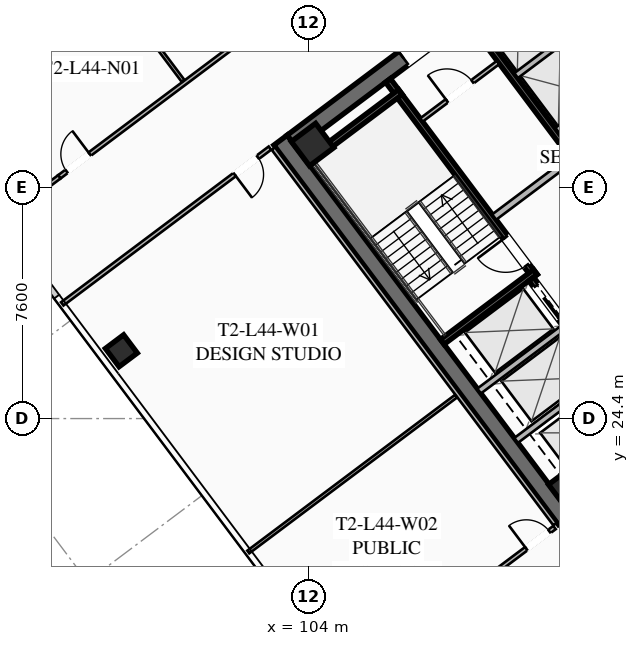
"""IFC4 building model, lengths in metres.
Left out: names, types, materials, properties, quantities, classifications, styles, units other than length and angle.
Written with IfcOpenShell. Run it as: python <this file> out.ifc"""

import sys

from ifc_helpers import new_model, si_unit, direction, frame, frame_2d, origin, origin_2d, place, context, subcontext, project, spatial, rectangle, hollow_rectangle, extrude, element, fill, save


model = new_model("IFC4")
c1 = context("Model", 3, precision=1e-05, world=origin(), true_north=direction((0.0, 1.0)))
c2 = subcontext(c1, "Body", "Model", "MODEL_VIEW")
j1 = project(units=[si_unit("LENGTHUNIT", "METRE"), si_unit("PLANEANGLEUNIT", "RADIAN")], contexts=[c1])
p1 = place(None, origin())
s1 = spatial("IfcSite", under=j1, at=p1, CompositionType="ELEMENT")
p2 = place(p1, origin())
s2 = spatial("IfcBuilding", under=s1, at=p2, CompositionType="ELEMENT")
p3 = place(p2, frame((0.0, 0.0, 164.1)))
s3 = spatial("IfcBuildingStorey", under=s2, at=p3, CompositionType="ELEMENT", Elevation=164.1)
p4 = place(p3, frame((112.436, 21.077, 0.0), z_axis=(0.0, 0.0, 1.0), x_axis=(-0.600005007985, 0.799996243986, 0.0)))
e1 = element("IfcWall", 1, at=p4, inside=s3, PredefinedType="SHEAR", context=c2, shape_type="SweptSolid", body=[
    extrude(rectangle(XDim=15.6, YDim=0.55, at=frame_2d((7.8, 0.0))), origin(), (0.0, 0.0, 1.0), 3.55),
])
p5 = place(p3, frame((103.461, 33.502, 0.0), z_axis=(0.0, 0.0, 1.0), x_axis=(0.799998054672, 0.600002593761, 0.0)))
e2 = element("IfcWall", 2, at=p5, inside=s3, PredefinedType="SHEAR", context=c2, shape_type="SweptSolid", body=[
    extrude(rectangle(XDim=15.06, YDim=0.55, at=frame_2d((7.53, 0.0))), origin(), (0.0, 0.0, 1.0), 3.55),
])
p6 = place(p5, frame((4.58, 0.0, 0.0)))
e3 = element("IfcOpeningElement", 3, at=p6, cuts=e2, PredefinedType="OPENING", context=c2, shape_type="SweptSolid", body=[
    extrude(rectangle(XDim=1.25, YDim=2.25, at=frame_2d((0.625, 1.125))), frame((0.0, 0.285, 0.0), z_axis=(0.0, -1.0, 0.0), x_axis=(1.0, 0.0, 0.0)), (0.0, 0.0, 1.0), 0.57),
])
p7 = place(p5, frame((9.63, 0.0, 0.0)))
e4 = element("IfcOpeningElement", 4, at=p7, cuts=e2, PredefinedType="OPENING", context=c2, shape_type="SweptSolid", body=[
    extrude(rectangle(XDim=1.25, YDim=2.25, at=frame_2d((0.625, 1.125))), frame((0.0, 0.285, 0.0), z_axis=(0.0, -1.0, 0.0), x_axis=(1.0, 0.0, 0.0)), (0.0, 0.0, 1.0), 0.57),
])
for number, where, z_axis, x_axis in (
    (5, (112.59, 22.13, 0.0), (0.0, 0.0, 1.0), (0.8, 0.6, 0.0)),
    (6, (104.13, 33.41, 0.0), (0.0, 0.0, 1.0), (0.8, 0.6, 0.0)),
):
    element("IfcColumn", number, at=place(p3, frame(where, z_axis=z_axis, x_axis=x_axis)), inside=s3, PredefinedType="COLUMN", context=c2, shape_type="SweptSolid", body=[
        extrude(hollow_rectangle(XDim=1.0, YDim=1.0, WallThickness=0.04, at=origin_2d()), origin(), (0.0, 0.0, 1.0), 3.37),
    ])
p8 = place(p3, frame((97.84, 26.63, 0.0), z_axis=(0.0, 0.0, 1.0), x_axis=(0.799999996291, 0.600000004945, 0.0)))
e7 = element("IfcColumn", 7, at=p8, inside=s3, PredefinedType="COLUMN", context=c2, shape_type="SweptSolid", body=[
    extrude(hollow_rectangle(XDim=0.75, YDim=0.75, WallThickness=0.032, at=origin_2d()), origin(), (0.0, 0.0, 1.0), 3.37),
])
p9 = place(p3, frame((111.44, 29.08, 0.0), z_axis=(0.0, 0.0, 1.0), x_axis=(-0.59999029481, 0.8000072788, 0.0)))
e8 = element("IfcWall", 8, at=p9, inside=s3, PredefinedType="SHEAR", context=c2, shape_type="SweptSolid", body=[
    extrude(rectangle(XDim=8.05, YDim=0.2, at=frame_2d((4.025, 0.0))), origin(), (0.0, 0.0, 1.0), 3.37),
])
p10 = place(p9, frame((0.45, 0.0, 0.0)))
e9 = element("IfcOpeningElement", 9, at=p10, cuts=e8, PredefinedType="OPENING", context=c2, shape_type="SweptSolid", body=[
    extrude(rectangle(XDim=1.15, YDim=2.2, at=frame_2d((0.575, 1.1))), frame((0.0, 0.11, 0.0), z_axis=(0.0, -1.0, 0.0), x_axis=(1.0, 0.0, 0.0)), (0.0, 0.0, 1.0), 0.22),
])
for number, where, z_axis, x_axis in (
    (10, (108.396, 26.922, 0.0), (0.0, 0.0, 1.0), (0.8, 0.6, 0.0)),
    (11, (103.956, 32.842, 0.0), (0.0, 0.0, 1.0), (0.8, 0.6, 0.0)),
):
    element("IfcWall", number, at=place(p3, frame(where, z_axis=z_axis, x_axis=x_axis)), inside=s3, PredefinedType="SHEAR", context=c2, shape_type="SweptSolid", body=[
        extrude(rectangle(XDim=3.83, YDim=0.2, at=frame_2d((1.915, 0.0))), origin(), (0.0, 0.0, 1.0), 3.37),
    ])
p11 = place(p3, frame((117.998, 25.936, 0.0), z_axis=(0.0, 0.0, 1.0), x_axis=(-0.600002693989, 0.799997979501, 0.0)))
e12 = element("IfcWall", 12, at=p11, inside=s3, PredefinedType="SHEAR", context=c2, shape_type="SweptSolid", body=[
    extrude(rectangle(XDim=14.5, YDim=0.2, at=frame_2d((7.25, 0.0))), origin(), (0.0, 0.0, 1.0), 3.37),
])
p12 = place(p3, frame((110.104, 31.028, 0.0), z_axis=(0.0, 0.0, 1.0), x_axis=(0.800018601094, 0.59997519774, 0.0)))
e13 = element("IfcWall", 13, at=p12, inside=s3, PredefinedType="SOLIDWALL", context=c2, shape_type="SweptSolid", body=[
    extrude(rectangle(XDim=3.15, YDim=0.22, at=frame_2d((1.575, 0.0))), origin(), (0.0, 0.0, 1.0), 2.723),
])
p13 = place(p3, frame((115.19, 23.83, 0.0), z_axis=(0.0, 0.0, 1.0), x_axis=(-0.599993943644, 0.800004542231, 0.0)))
e14 = element("IfcWall", 14, at=p13, inside=s3, PredefinedType="SHEAR", context=c2, shape_type="SweptSolid", body=[
    extrude(rectangle(XDim=6.45, YDim=0.2, at=frame_2d((3.225, 0.0))), origin(), (0.0, 0.0, 1.0), 3.37),
])
p14 = place(p13, frame((4.875, 0.0, 0.0)))
e15 = element("IfcOpeningElement", 15, at=p14, cuts=e14, PredefinedType="OPENING", context=c2, shape_type="SweptSolid", body=[
    extrude(rectangle(XDim=1.3, YDim=2.25, at=frame_2d((0.65, 1.125))), frame((0.0, 0.11, 0.0), z_axis=(0.0, -1.0, 0.0), x_axis=(1.0, 0.0, 0.0)), (0.0, 0.0, 1.0), 0.22),
])
p15 = place(p13, frame((2.875, 0.0, 0.0)))
e16 = element("IfcOpeningElement", 16, at=p15, cuts=e14, PredefinedType="OPENING", context=c2, shape_type="SweptSolid", body=[
    extrude(rectangle(XDim=1.3, YDim=2.25, at=frame_2d((0.65, 1.125))), frame((0.0, 0.11, 0.0), z_axis=(0.0, -1.0, 0.0), x_axis=(1.0, 0.0, 0.0)), (0.0, 0.0, 1.0), 0.22),
])
p16 = place(p13, frame((0.675, 0.0, 0.0)))
e17 = element("IfcOpeningElement", 17, at=p16, cuts=e14, PredefinedType="OPENING", context=c2, shape_type="SweptSolid", body=[
    extrude(rectangle(XDim=1.3, YDim=2.25, at=frame_2d((0.65, 1.125))), frame((0.0, 0.11, 0.0), z_axis=(0.0, -1.0, 0.0), x_axis=(1.0, 0.0, 0.0)), (0.0, 0.0, 1.0), 0.22),
])
for number, where, z_axis, x_axis in (
    (18, (110.826, 23.682, 0.0), (0.0, 0.0, 1.0), (0.8, 0.6, 0.0)),
    (19, (109.608, 25.306, 0.0), (0.0, 0.0, 1.0), (0.8, 0.6, 0.0)),
):
    element("IfcWall", number, at=place(p3, frame(where, z_axis=z_axis, x_axis=x_axis)), inside=s3, PredefinedType="SOLIDWALL", context=c2, shape_type="SweptSolid", body=[
        extrude(rectangle(XDim=3.48, YDim=0.2, at=frame_2d((1.74, 0.0))), origin(), (0.0, 0.0, 1.0), 3.37),
    ])
p17 = place(p3, frame((107.71, 34.22, 0.0), z_axis=(0.0, 0.0, 1.0), x_axis=(0.799981399002, 0.60002480053, 0.0)))
e20 = element("IfcWall", 20, at=p17, inside=s3, PredefinedType="PARTITIONING", context=c2, shape_type="SweptSolid", body=[
    extrude(rectangle(XDim=3.15, YDim=0.135, at=frame_2d((1.575, 0.0))), origin(), (0.0, 0.0, 1.0), 2.723),
])
p18 = place(p17, frame((1.05, 0.0, 0.0)))
e21 = element("IfcOpeningElement", 21, at=p18, cuts=e20, PredefinedType="OPENING", context=c2, shape_type="SweptSolid", body=[
    extrude(rectangle(XDim=1.05, YDim=2.2, at=frame_2d((0.525, 1.1))), frame((0.0, 0.077, 0.0), z_axis=(0.0, -1.0, 0.0), x_axis=(1.0, 0.0, 0.0)), (0.0, 0.0, 1.0), 0.155),
])
p19 = place(p3, frame((115.11, 33.27, 0.0), z_axis=(0.0, 0.0, 1.0), x_axis=(-0.600011322243, 0.799991508192, 0.0)))
e22 = element("IfcWall", 22, at=p19, inside=s3, PredefinedType="SOLIDWALL", context=c2, shape_type="SweptSolid", body=[
    extrude(rectangle(XDim=6.9, YDim=0.2, at=frame_2d((3.45, 0.0))), origin(), (0.0, 0.0, 1.0), 3.37),
])
p20 = place(p19, frame((0.575, 0.0, 0.0)))
e23 = element("IfcOpeningElement", 23, at=p20, cuts=e22, PredefinedType="OPENING", context=c2, shape_type="SweptSolid", body=[
    extrude(rectangle(XDim=1.1, YDim=2.2, at=frame_2d((0.55, 1.1))), frame((0.0, 0.11, 0.0), z_axis=(0.0, -1.0, 0.0), x_axis=(1.0, 0.0, 0.0)), (0.0, 0.0, 1.0), 0.22),
])
p21 = place(p19, frame((2.825, 0.0, 0.0)))
e24 = element("IfcOpeningElement", 24, at=p21, cuts=e22, PredefinedType="OPENING", context=c2, shape_type="SweptSolid", body=[
    extrude(rectangle(XDim=1.1, YDim=2.2, at=frame_2d((0.55, 1.1))), frame((0.0, 0.11, 0.0), z_axis=(0.0, -1.0, 0.0), x_axis=(1.0, 0.0, 0.0)), (0.0, 0.0, 1.0), 0.22),
])
p22 = place(p19, frame((5.075, 0.0, 0.0)))
e25 = element("IfcOpeningElement", 25, at=p22, cuts=e22, PredefinedType="OPENING", context=c2, shape_type="SweptSolid", body=[
    extrude(rectangle(XDim=1.1, YDim=2.2, at=frame_2d((0.55, 1.1))), frame((0.0, 0.11, 0.0), z_axis=(0.0, -1.0, 0.0), x_axis=(1.0, 0.0, 0.0)), (0.0, 0.0, 1.0), 0.22),
])
p23 = place(p3, frame((112.176, 33.882, 0.0), z_axis=(0.0, 0.0, 1.0), x_axis=(0.8, 0.6, 0.0)))
e26 = element("IfcWall", 26, at=p23, inside=s3, PredefinedType="SOLIDWALL", context=c2, shape_type="SweptSolid", body=[
    extrude(rectangle(XDim=1.88, YDim=0.2, at=frame_2d((0.94, 0.0))), origin(), (0.0, 0.0, 1.0), 3.37),
])
p24 = place(p3, frame((110.826, 35.682, 0.0), z_axis=(0.0, 0.0, 1.0), x_axis=(0.799984418148, 0.600020775241, 0.0)))
e27 = element("IfcWall", 27, at=p24, inside=s3, PredefinedType="SOLIDWALL", context=c2, shape_type="SweptSolid", body=[
    extrude(rectangle(XDim=1.88, YDim=0.2, at=frame_2d((0.94, 0.0))), origin(), (0.0, 0.0, 1.0), 3.37),
])
p25 = place(p3, frame((95.8, 32.35, 0.0), z_axis=(0.0, 0.0, 1.0), x_axis=(0.8, 0.6, 0.0)))
e28 = element("IfcWall", 28, at=p25, inside=s3, PredefinedType="PARTITIONING", context=c2, shape_type="SweptSolid", body=[
    extrude(rectangle(XDim=28.7, YDim=0.135, at=frame_2d((14.35, 0.0))), origin(), (0.0, 0.0, 1.0), 2.723),
])
p26 = place(p25, frame((0.3, 0.0, 0.0)))
e29 = element("IfcOpeningElement", 29, at=p26, cuts=e28, PredefinedType="OPENING", context=c2, shape_type="SweptSolid", body=[
    extrude(rectangle(XDim=0.95, YDim=2.05, at=frame_2d((0.475, 1.025))), frame((0.0, 0.077, 0.0), z_axis=(0.0, -1.0, 0.0), x_axis=(1.0, 0.0, 0.0)), (0.0, 0.0, 1.0), 0.155),
])
p27 = place(p25, frame((9.959, 0.0, 0.0)))
e30 = element("IfcOpeningElement", 30, at=p27, cuts=e28, PredefinedType="OPENING", context=c2, shape_type="SweptSolid", body=[
    extrude(rectangle(XDim=0.95, YDim=2.05, at=frame_2d((0.475, 1.025))), frame((0.0, 0.077, 0.0), z_axis=(0.0, -1.0, 0.0), x_axis=(1.0, 0.0, 0.0)), (0.0, 0.0, 1.0), 0.155),
])
p28 = place(p25, frame((14.005, 0.0, 0.0)))
e31 = element("IfcOpeningElement", 31, at=p28, cuts=e28, PredefinedType="OPENING", context=c2, shape_type="SweptSolid", body=[
    extrude(rectangle(XDim=0.95, YDim=2.05, at=frame_2d((0.475, 1.025))), frame((0.0, 0.077, 0.0), z_axis=(0.0, -1.0, 0.0), x_axis=(1.0, 0.0, 0.0)), (0.0, 0.0, 1.0), 0.155),
])
p29 = place(p25, frame((18.049, 0.0, 0.0)))
e32 = element("IfcOpeningElement", 32, at=p29, cuts=e28, PredefinedType="OPENING", context=c2, shape_type="SweptSolid", body=[
    extrude(rectangle(XDim=0.95, YDim=2.05, at=frame_2d((0.475, 1.025))), frame((0.0, 0.077, 0.0), z_axis=(0.0, -1.0, 0.0), x_axis=(1.0, 0.0, 0.0)), (0.0, 0.0, 1.0), 0.155),
])
p30 = place(p25, frame((27.45, 0.0, 0.0)))
e33 = element("IfcOpeningElement", 33, at=p30, cuts=e28, PredefinedType="OPENING", context=c2, shape_type="SweptSolid", body=[
    extrude(rectangle(XDim=0.95, YDim=2.05, at=frame_2d((0.475, 1.025))), frame((0.0, 0.077, 0.0), z_axis=(0.0, -1.0, 0.0), x_axis=(1.0, 0.0, 0.0)), (0.0, 0.0, 1.0), 0.155),
])
p31 = place(p3, frame((93.856, 30.892, 0.0), z_axis=(0.0, 0.0, 1.0), x_axis=(0.800012055778, 0.599983925293, 0.0)))
e34 = element("IfcWall", 34, at=p31, inside=s3, PredefinedType="PARTITIONING", context=c2, shape_type="SweptSolid", body=[
    extrude(rectangle(XDim=2.43, YDim=0.135, at=frame_2d((1.215, 0.0))), origin(), (0.0, 0.0, 1.0), 2.723),
])
p32 = place(p3, frame((99.872, 35.504, 0.0), z_axis=(0.0, 0.0, 1.0), x_axis=(-0.599992897893, 0.800005326531, 0.0)))
e35 = element("IfcWall", 35, at=p32, inside=s3, PredefinedType="PARTITIONING", context=c2, shape_type="SweptSolid", body=[
    extrude(rectangle(XDim=5.5, YDim=0.11, at=frame_2d((2.75, 0.0))), origin(), (0.0, 0.0, 1.0), 2.723),
])
p33 = place(p3, frame((131.282, 32.874, 0.0), z_axis=(0.0, 0.0, 1.0), x_axis=(-0.8, -0.6, 0.0)))
e36 = element("IfcWall", 36, at=p33, inside=s3, PredefinedType="PARTITIONING", context=c2, shape_type="SweptSolid", body=[
    extrude(rectangle(XDim=28.7, YDim=0.135, at=frame_2d((14.35, 0.0))), origin(), (0.0, 0.0, 1.0), 2.723),
])
p34 = place(p33, frame((27.37, 0.0, 0.0)))
e37 = element("IfcOpeningElement", 37, at=p34, cuts=e36, PredefinedType="OPENING", context=c2, shape_type="SweptSolid", body=[
    extrude(rectangle(XDim=0.95, YDim=2.05, at=frame_2d((0.475, 1.025))), frame((0.0, 0.077, 0.0), z_axis=(0.0, -1.0, 0.0), x_axis=(1.0, 0.0, 0.0)), (0.0, 0.0, 1.0), 0.155),
])
p35 = place(p33, frame((13.592, 0.0, 0.0)))
e38 = element("IfcOpeningElement", 38, at=p35, cuts=e36, PredefinedType="OPENING", context=c2, shape_type="SweptSolid", body=[
    extrude(rectangle(XDim=0.95, YDim=2.05, at=frame_2d((0.475, 1.025))), frame((0.0, 0.077, 0.0), z_axis=(0.0, -1.0, 0.0), x_axis=(1.0, 0.0, 0.0)), (0.0, 0.0, 1.0), 0.155),
])
p36 = place(p33, frame((0.38, 0.0, 0.0)))
e39 = element("IfcOpeningElement", 39, at=p36, cuts=e36, PredefinedType="OPENING", context=c2, shape_type="SweptSolid", body=[
    extrude(rectangle(XDim=0.95, YDim=2.05, at=frame_2d((0.475, 1.025))), frame((0.0, 0.077, 0.0), z_axis=(0.0, -1.0, 0.0), x_axis=(1.0, 0.0, 0.0)), (0.0, 0.0, 1.0), 0.155),
])
p37 = place(p3, frame((112.104, 20.928, 0.0), z_axis=(0.0, 0.0, 1.0), x_axis=(-0.599994940075, 0.800003794918, 0.0)))
e40 = element("IfcWall", 40, at=p37, inside=s3, PredefinedType="PARTITIONING", context=c2, shape_type="SweptSolid", body=[
    extrude(rectangle(XDim=15.44, YDim=0.135, at=frame_2d((7.72, 0.0))), origin(), (0.0, 0.0, 1.0), 2.723),
])
p38 = place(p3, frame((102.728, 33.296, 0.0), z_axis=(0.0, 0.0, 1.0), x_axis=(-0.800013722153, -0.59998170336, 0.0)))
e41 = element("IfcWall", 41, at=p38, inside=s3, PredefinedType="PARTITIONING", context=c2, shape_type="SweptSolid", body=[
    extrude(rectangle(XDim=8.54, YDim=0.135, at=frame_2d((4.27, 0.0))), origin(), (0.0, 0.0, 1.0), 2.723),
])
p39 = place(p38, frame((0.5, 0.0, 0.0)))
e42 = element("IfcOpeningElement", 42, at=p39, cuts=e41, PredefinedType="OPENING", context=c2, shape_type="SweptSolid", body=[
    extrude(rectangle(XDim=0.95, YDim=2.05, at=frame_2d((0.475, 1.025))), frame((0.0, 0.077, 0.0), z_axis=(0.0, -1.0, 0.0), x_axis=(1.0, 0.0, 0.0)), (0.0, 0.0, 1.0), 0.155),
])
p40 = place(p3, frame((105.256, 15.692, 0.0), z_axis=(0.0, 0.0, 1.0), x_axis=(0.799989708052, 0.600013722352, 0.0)))
e43 = element("IfcWall", 43, at=p40, inside=s3, PredefinedType="PARTITIONING", context=c2, shape_type="SweptSolid", body=[
    extrude(rectangle(XDim=8.54, YDim=0.135, at=frame_2d((4.27, 0.0))), origin(), (0.0, 0.0, 1.0), 2.723),
])
p41 = place(p40, frame((7.38, 0.0, 0.0)))
e44 = element("IfcOpeningElement", 44, at=p41, cuts=e43, PredefinedType="OPENING", context=c2, shape_type="SweptSolid", body=[
    extrude(rectangle(XDim=0.95, YDim=2.05, at=frame_2d((0.475, 1.025))), frame((0.0, 0.077, 0.0), z_axis=(0.0, -1.0, 0.0), x_axis=(1.0, 0.0, 0.0)), (0.0, 0.0, 1.0), 0.155),
])
p42 = place(p3, frame((102.016, 20.012, 0.0), z_axis=(0.0, 0.0, 1.0), x_axis=(0.799989708052, 0.600013722352, 0.0)))
e45 = element("IfcWall", 45, at=p42, inside=s3, PredefinedType="PARTITIONING", context=c2, shape_type="SweptSolid", body=[
    extrude(rectangle(XDim=8.54, YDim=0.11, at=frame_2d((4.27, 0.0))), origin(), (0.0, 0.0, 1.0), 2.723),
])
p43 = place(p6, origin())
e46 = element("IfcDoor", 46, at=p43, inside=s3, OperationType="SINGLE_SWING_LEFT", PredefinedType="DOOR", context=c2, shape_type="SweptSolid", body=[
    extrude(rectangle(XDim=1.25, YDim=2.25, at=frame_2d((0.625, 1.125))), frame((0.0, 0.025, 0.0), z_axis=(0.0, -1.0, 0.0), x_axis=(1.0, 0.0, 0.0)), (0.0, 0.0, 1.0), 0.05),
])
fill(e3, e46)
p44 = place(p10, origin())
e47 = element("IfcDoor", 47, at=p44, inside=s3, OperationType="SINGLE_SWING_RIGHT", PredefinedType="DOOR", context=c2, shape_type="SweptSolid", body=[
    extrude(rectangle(XDim=1.15, YDim=2.2, at=frame_2d((0.575, 1.1))), frame((0.0, 0.025, 0.0), z_axis=(0.0, -1.0, 0.0), x_axis=(1.0, 0.0, 0.0)), (0.0, 0.0, 1.0), 0.05),
])
fill(e9, e47)
p45 = place(p18, origin())
e48 = element("IfcDoor", 48, at=p45, inside=s3, OperationType="SINGLE_SWING_LEFT", PredefinedType="DOOR", context=c2, shape_type="SweptSolid", body=[
    extrude(rectangle(XDim=1.05, YDim=2.2, at=frame_2d((0.525, 1.1))), frame((0.0, 0.025, 0.0), z_axis=(0.0, -1.0, 0.0), x_axis=(1.0, 0.0, 0.0)), (0.0, 0.0, 1.0), 0.05),
])
fill(e21, e48)
p46 = place(p26, origin())
e49 = element("IfcDoor", 49, at=p46, inside=s3, OperationType="SINGLE_SWING_RIGHT", PredefinedType="DOOR", context=c2, shape_type="SweptSolid", body=[
    extrude(rectangle(XDim=0.95, YDim=2.05, at=frame_2d((0.475, 1.025))), frame((0.0, 0.025, 0.0), z_axis=(0.0, -1.0, 0.0), x_axis=(1.0, 0.0, 0.0)), (0.0, 0.0, 1.0), 0.05),
])
fill(e29, e49)
p47 = place(p39, origin())
e50 = element("IfcDoor", 50, at=p47, inside=s3, OperationType="SINGLE_SWING_RIGHT", PredefinedType="DOOR", context=c2, shape_type="SweptSolid", body=[
    extrude(rectangle(XDim=0.95, YDim=2.05, at=frame_2d((0.475, 1.025))), frame((0.0, 0.025, 0.0), z_axis=(0.0, -1.0, 0.0), x_axis=(1.0, 0.0, 0.0)), (0.0, 0.0, 1.0), 0.05),
])
fill(e42, e50)
p48 = place(p41, origin())
e51 = element("IfcDoor", 51, at=p48, inside=s3, OperationType="SINGLE_SWING_LEFT", PredefinedType="DOOR", context=c2, shape_type="SweptSolid", body=[
    extrude(rectangle(XDim=0.95, YDim=2.05, at=frame_2d((0.475, 1.025))), frame((0.0, 0.025, 0.0), z_axis=(0.0, -1.0, 0.0), x_axis=(1.0, 0.0, 0.0)), (0.0, 0.0, 1.0), 0.05),
])
fill(e44, e51)
p49 = place(p14, origin())
e52 = element("IfcDoor", 52, at=p49, inside=s3, OperationType="SLIDING_TO_LEFT", PredefinedType="DOOR", context=c2, shape_type="SweptSolid", body=[
    extrude(rectangle(XDim=1.3, YDim=2.25, at=frame_2d((0.65, 1.125))), frame((0.0, 0.025, 0.0), z_axis=(0.0, -1.0, 0.0), x_axis=(1.0, 0.0, 0.0)), (0.0, 0.0, 1.0), 0.05),
])
fill(e15, e52)
save(model, sys.argv[1])
